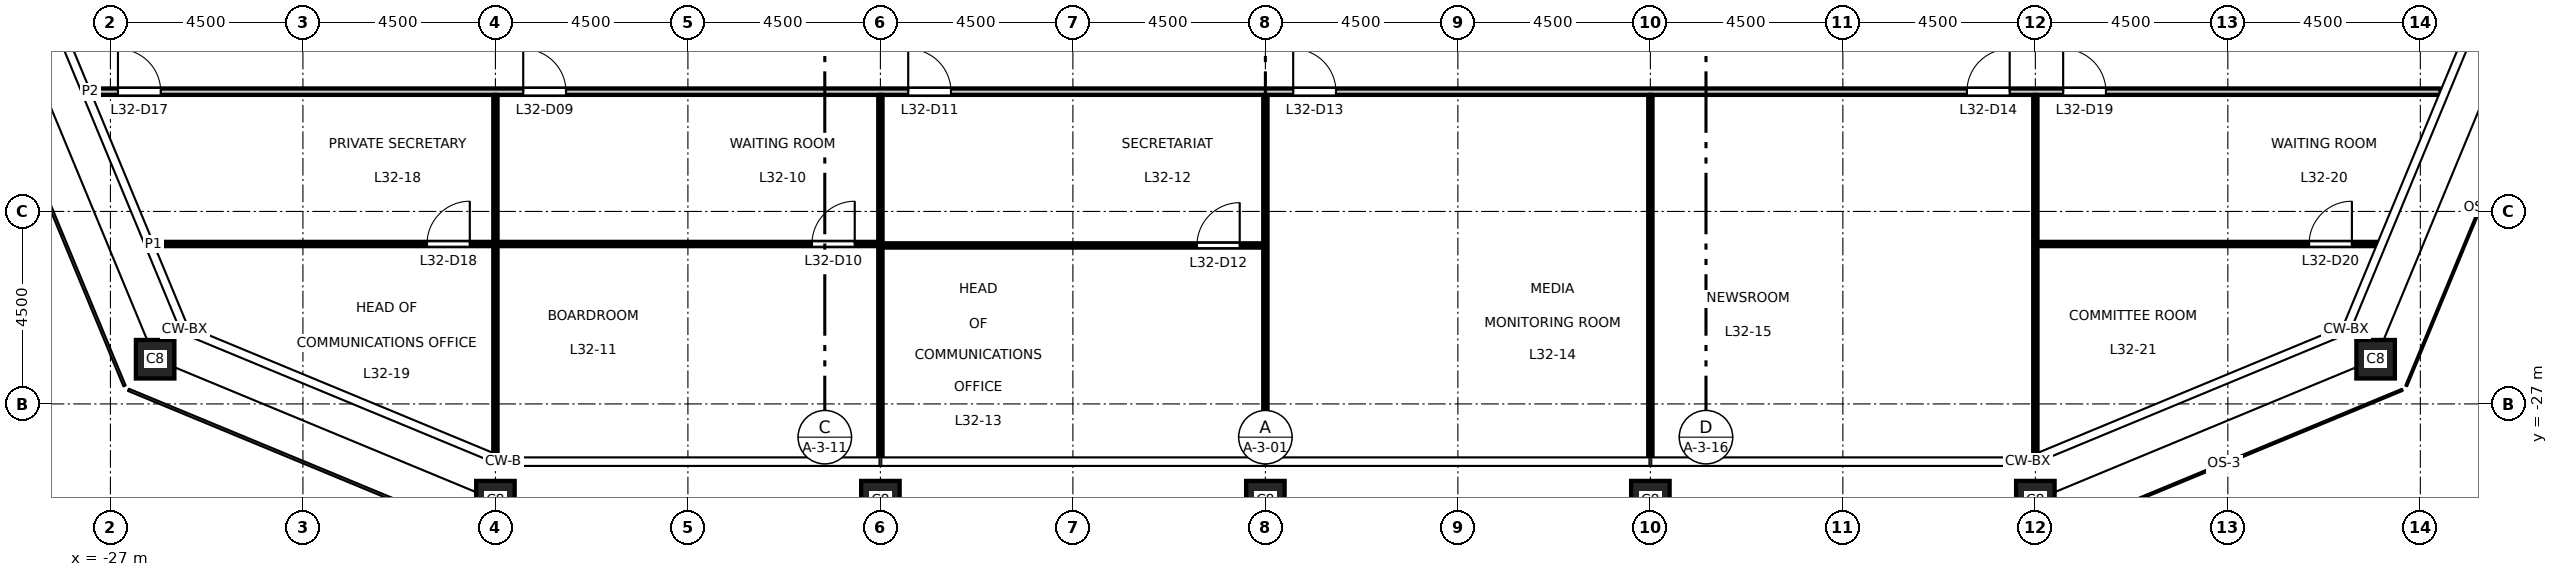
"""IFC4 building model, lengths in metres.
Left out: names, types, materials, properties, quantities, classifications, styles, units other than length and angle.
Written with IfcOpenShell. Run it as: python <this file> out.ifc"""

import sys

from ifc_helpers import new_model, si_unit, direction, frame, frame_2d, origin, origin_2d, place, context, subcontext, project, spatial, rectangle, hollow_rectangle, extrude, element, fill, save


model = new_model("IFC4")
c1 = context("Model", 3, precision=1e-05, world=origin(), true_north=direction((0.0, 1.0)))
c2 = subcontext(c1, "Body", "Model", "MODEL_VIEW")
j1 = project(units=[si_unit("LENGTHUNIT", "METRE"), si_unit("PLANEANGLEUNIT", "RADIAN")], contexts=[c1])
p1 = place(None, origin())
s1 = spatial("IfcSite", under=j1, at=p1, CompositionType="ELEMENT")
p2 = place(p1, origin())
s2 = spatial("IfcBuilding", under=s1, at=p2, CompositionType="ELEMENT")
p3 = place(p2, frame((0.0, 0.0, 149.7)))
s3 = spatial("IfcBuildingStorey", under=s2, at=p3, CompositionType="ELEMENT", Elevation=149.7)
for number, where, z_axis, x_axis in (
    (1, (-18.0, -29.25, 0.0), (0.0, 0.0, 1.0), (1.0, 0.0, 0.0)),
    (2, (-9.0, -29.25, 0.0), (0.0, 0.0, 1.0), (1.0, 0.0, 0.0)),
    (3, (0.0, -29.25, 0.0), (0.0, 0.0, 1.0), (1.0, 0.0, 0.0)),
    (4, (9.0, -29.25, 0.0), (0.0, 0.0, 1.0), (1.0, 0.0, 0.0)),
    (5, (18.0, -29.25, 0.0), (0.0, 0.0, 1.0), (1.0, 0.0, 0.0)),
    (6, (25.955, -25.955, 0.0), (0.0, 0.0, 1.0), (1.0, 0.0, 0.0)),
    (7, (-25.955, -25.955, 0.0), (0.0, 0.0, 1.0), (1.0, 0.0, 0.0)),
):
    element("IfcColumn", number, at=place(p3, frame(where, z_axis=z_axis, x_axis=x_axis)), inside=s3, PredefinedType="COLUMN", context=c2, shape_type="SweptSolid", body=[
        extrude(hollow_rectangle(XDim=0.9, YDim=0.9, WallThickness=0.05, at=origin_2d()), origin(), (0.0, 0.0, 1.0), 4.5),
    ])
p4 = place(p3, frame((-8.95, -23.295, 0.0), z_axis=(0.0, 0.0, 1.0), x_axis=(1.0, 0.0, 0.0)))
e8 = element("IfcWall", 8, at=p4, inside=s3, PredefinedType="PARTITIONING", context=c2, shape_type="SweptSolid", body=[
    extrude(rectangle(XDim=8.9, YDim=0.1, at=frame_2d((4.45, 0.0))), origin(), (0.0, 0.0, 1.0), 4.35),
])
p5 = place(p4, frame((7.35, 0.0, 0.0)))
e9 = element("IfcOpeningElement", 9, at=p5, cuts=e8, PredefinedType="OPENING", context=c2, shape_type="SweptSolid", body=[
    extrude(rectangle(XDim=1.0, YDim=2.1, at=frame_2d((0.5, 1.05))), frame((0.0, 0.06, 0.0), z_axis=(0.0, -1.0, 0.0), x_axis=(1.0, 0.0, 0.0)), (0.0, 0.0, 1.0), 0.12),
])
p6 = place(p3, frame((-25.999, -23.261, 0.0), z_axis=(0.0, 0.0, 1.0), x_axis=(1.0, 0.0, 0.0)))
e10 = element("IfcWall", 10, at=p6, inside=s3, PredefinedType="PARTITIONING", context=c2, shape_type="SweptSolid", body=[
    extrude(rectangle(XDim=16.949, YDim=0.1, at=frame_2d((8.475, 0.0))), origin(), (0.0, 0.0, 1.0), 4.35),
])
p7 = place(p6, frame((15.399, 0.0, 0.0)))
e11 = element("IfcOpeningElement", 11, at=p7, cuts=e10, PredefinedType="OPENING", context=c2, shape_type="SweptSolid", body=[
    extrude(rectangle(XDim=1.0, YDim=2.1, at=frame_2d((0.5, 1.05))), frame((0.0, 0.06, 0.0), z_axis=(0.0, -1.0, 0.0), x_axis=(1.0, 0.0, 0.0)), (0.0, 0.0, 1.0), 0.12),
])
p8 = place(p6, frame((6.4, 0.0, 0.0)))
e12 = element("IfcOpeningElement", 12, at=p8, cuts=e10, PredefinedType="OPENING", context=c2, shape_type="SweptSolid", body=[
    extrude(rectangle(XDim=1.0, YDim=2.1, at=frame_2d((0.5, 1.05))), frame((0.0, 0.06, 0.0), z_axis=(0.0, -1.0, 0.0), x_axis=(1.0, 0.0, 0.0)), (0.0, 0.0, 1.0), 0.12),
])
p9 = place(p3, frame((18.05, -23.261, 0.0), z_axis=(0.0, 0.0, 1.0), x_axis=(1.0, 0.0, 0.0)))
e13 = element("IfcWall", 13, at=p9, inside=s3, PredefinedType="PARTITIONING", context=c2, shape_type="SweptSolid", body=[
    extrude(rectangle(XDim=7.949, YDim=0.1, at=frame_2d((3.975, 0.0))), origin(), (0.0, 0.0, 1.0), 4.35),
])
p10 = place(p9, frame((6.35, 0.0, 0.0)))
e14 = element("IfcOpeningElement", 14, at=p10, cuts=e13, PredefinedType="OPENING", context=c2, shape_type="SweptSolid", body=[
    extrude(rectangle(XDim=1.0, YDim=2.1, at=frame_2d((0.5, 1.05))), frame((0.0, 0.06, 0.0), z_axis=(0.0, -1.0, 0.0), x_axis=(1.0, 0.0, 0.0)), (0.0, 0.0, 1.0), 0.12),
])
p11 = place(p3, frame((-27.474, -19.7, 0.0), z_axis=(0.0, 0.0, 1.0), x_axis=(1.0, 0.0, 0.0)))
e15 = element("IfcWall", 15, at=p11, inside=s3, PredefinedType="PARTITIONING", context=c2, shape_type="SweptSolid", body=[
    extrude(rectangle(XDim=54.948, YDim=0.15, at=frame_2d((27.474, 0.0))), origin(), (0.0, 0.0, 1.0), 4.35),
])
p12 = place(p11, frame((10.124, 0.0, 0.0)))
e16 = element("IfcOpeningElement", 16, at=p12, cuts=e15, PredefinedType="OPENING", context=c2, shape_type="SweptSolid", body=[
    extrude(rectangle(XDim=1.0, YDim=2.1, at=frame_2d((0.5, 1.05))), frame((0.0, 0.085, 0.0), z_axis=(0.0, -1.0, 0.0), x_axis=(1.0, 0.0, 0.0)), (0.0, 0.0, 1.0), 0.17),
])
p13 = place(p11, frame((19.124, 0.0, 0.0)))
e17 = element("IfcOpeningElement", 17, at=p13, cuts=e15, PredefinedType="OPENING", context=c2, shape_type="SweptSolid", body=[
    extrude(rectangle(XDim=1.0, YDim=2.1, at=frame_2d((0.5, 1.05))), frame((0.0, 0.085, 0.0), z_axis=(0.0, -1.0, 0.0), x_axis=(1.0, 0.0, 0.0)), (0.0, 0.0, 1.0), 0.17),
])
p14 = place(p11, frame((28.124, 0.0, 0.0)))
e18 = element("IfcOpeningElement", 18, at=p14, cuts=e15, PredefinedType="OPENING", context=c2, shape_type="SweptSolid", body=[
    extrude(rectangle(XDim=1.0, YDim=2.1, at=frame_2d((0.5, 1.05))), frame((0.0, 0.085, 0.0), z_axis=(0.0, -1.0, 0.0), x_axis=(1.0, 0.0, 0.0)), (0.0, 0.0, 1.0), 0.17),
])
p15 = place(p11, frame((43.874, 0.0, 0.0)))
e19 = element("IfcOpeningElement", 19, at=p15, cuts=e15, PredefinedType="OPENING", context=c2, shape_type="SweptSolid", body=[
    extrude(rectangle(XDim=1.0, YDim=2.1, at=frame_2d((0.5, 1.05))), frame((0.0, 0.085, 0.0), z_axis=(0.0, -1.0, 0.0), x_axis=(1.0, 0.0, 0.0)), (0.0, 0.0, 1.0), 0.17),
])
p16 = place(p11, frame((0.65, 0.0, 0.0)))
e20 = element("IfcOpeningElement", 20, at=p16, cuts=e15, PredefinedType="OPENING", context=c2, shape_type="SweptSolid", body=[
    extrude(rectangle(XDim=1.0, YDim=2.1, at=frame_2d((0.5, 1.05))), frame((0.0, 0.085, 0.0), z_axis=(0.0, -1.0, 0.0), x_axis=(1.0, 0.0, 0.0)), (0.0, 0.0, 1.0), 0.17),
])
p17 = place(p11, frame((46.124, 0.0, 0.0)))
e21 = element("IfcOpeningElement", 21, at=p17, cuts=e15, PredefinedType="OPENING", context=c2, shape_type="SweptSolid", body=[
    extrude(rectangle(XDim=1.0, YDim=2.1, at=frame_2d((0.5, 1.05))), frame((0.0, 0.085, 0.0), z_axis=(0.0, -1.0, 0.0), x_axis=(1.0, 0.0, 0.0)), (0.0, 0.0, 1.0), 0.17),
])
p18 = place(p3, frame((-18.0, -28.178, 0.0), z_axis=(0.0, 0.0, 1.0), x_axis=(0.0, 1.0, 0.0)))
e22 = element("IfcWall", 22, at=p18, inside=s3, PredefinedType="PARTITIONING", context=c2, shape_type="SweptSolid", body=[
    extrude(rectangle(XDim=4.867, YDim=0.1, at=frame_2d((2.434, 0.0))), origin(), (0.0, 0.0, 1.0), 3.45),
])
p19 = place(p3, frame((-18.0, -23.211, 0.0), z_axis=(0.0, 0.0, 1.0), x_axis=(0.0, 1.0, 0.0)))
e23 = element("IfcWall", 23, at=p19, inside=s3, PredefinedType="PARTITIONING", context=c2, shape_type="SweptSolid", body=[
    extrude(rectangle(XDim=3.436, YDim=0.1, at=frame_2d((1.718, 0.0))), origin(), (0.0, 0.0, 1.0), 3.45),
])
for number, where, z_axis, x_axis in (
    (24, (-9.0, -28.26, 0.0), (0.0, 0.0, 1.0), (0.0, 1.0, 0.0)),
    (25, (0.0, -28.26, 0.0), (0.0, 0.0, 1.0), (0.0, 1.0, 0.0)),
    (26, (9.0, -28.26, 0.0), (0.0, 0.0, 1.0), (0.0, 1.0, 0.0)),
):
    element("IfcWall", number, at=place(p3, frame(where, z_axis=z_axis, x_axis=x_axis)), inside=s3, PredefinedType="PARTITIONING", context=c2, shape_type="SweptSolid", body=[
        extrude(rectangle(XDim=8.485, YDim=0.1, at=frame_2d((4.243, 0.0))), origin(), (0.0, 0.0, 1.0), 3.45),
    ])
p20 = place(p3, frame((18.0, -28.178, 0.0), z_axis=(0.0, 0.0, 1.0), x_axis=(0.0, 1.0, 0.0)))
e27 = element("IfcWall", 27, at=p20, inside=s3, PredefinedType="PARTITIONING", context=c2, shape_type="SweptSolid", body=[
    extrude(rectangle(XDim=8.403, YDim=0.1, at=frame_2d((4.202, 0.0))), origin(), (0.0, 0.0, 1.0), 3.45),
])
p21 = place(p12, origin())
e28 = element("IfcDoor", 28, at=p21, inside=s3, OperationType="SINGLE_SWING_LEFT", PredefinedType="DOOR", context=c2, shape_type="SweptSolid", body=[
    extrude(rectangle(XDim=1.0, YDim=2.1, at=frame_2d((0.5, 1.05))), frame((0.0, 0.025, 0.0), z_axis=(0.0, -1.0, 0.0), x_axis=(1.0, 0.0, 0.0)), (0.0, 0.0, 1.0), 0.05),
])
fill(e16, e28)
p22 = place(p7, origin())
e29 = element("IfcDoor", 29, at=p22, inside=s3, OperationType="SINGLE_SWING_RIGHT", PredefinedType="DOOR", context=c2, shape_type="SweptSolid", body=[
    extrude(rectangle(XDim=1.0, YDim=2.1, at=frame_2d((0.5, 1.05))), frame((0.0, 0.025, 0.0), z_axis=(0.0, -1.0, 0.0), x_axis=(1.0, 0.0, 0.0)), (0.0, 0.0, 1.0), 0.05),
])
fill(e11, e29)
p23 = place(p13, origin())
e30 = element("IfcDoor", 30, at=p23, inside=s3, OperationType="SINGLE_SWING_LEFT", PredefinedType="DOOR", context=c2, shape_type="SweptSolid", body=[
    extrude(rectangle(XDim=1.0, YDim=2.1, at=frame_2d((0.5, 1.05))), frame((0.0, 0.025, 0.0), z_axis=(0.0, -1.0, 0.0), x_axis=(1.0, 0.0, 0.0)), (0.0, 0.0, 1.0), 0.05),
])
fill(e17, e30)
p24 = place(p5, origin())
e31 = element("IfcDoor", 31, at=p24, inside=s3, OperationType="SINGLE_SWING_RIGHT", PredefinedType="DOOR", context=c2, shape_type="SweptSolid", body=[
    extrude(rectangle(XDim=1.0, YDim=2.1, at=frame_2d((0.5, 1.05))), frame((0.0, 0.025, 0.0), z_axis=(0.0, -1.0, 0.0), x_axis=(1.0, 0.0, 0.0)), (0.0, 0.0, 1.0), 0.05),
])
fill(e9, e31)
p25 = place(p14, origin())
e32 = element("IfcDoor", 32, at=p25, inside=s3, OperationType="SINGLE_SWING_LEFT", PredefinedType="DOOR", context=c2, shape_type="SweptSolid", body=[
    extrude(rectangle(XDim=1.0, YDim=2.1, at=frame_2d((0.5, 1.05))), frame((0.0, 0.025, 0.0), z_axis=(0.0, -1.0, 0.0), x_axis=(1.0, 0.0, 0.0)), (0.0, 0.0, 1.0), 0.05),
])
fill(e18, e32)
p26 = place(p15, origin())
e33 = element("IfcDoor", 33, at=p26, inside=s3, OperationType="SINGLE_SWING_RIGHT", PredefinedType="DOOR", context=c2, shape_type="SweptSolid", body=[
    extrude(rectangle(XDim=1.0, YDim=2.1, at=frame_2d((0.5, 1.05))), frame((0.0, 0.025, 0.0), z_axis=(0.0, -1.0, 0.0), x_axis=(1.0, 0.0, 0.0)), (0.0, 0.0, 1.0), 0.05),
])
fill(e19, e33)
p27 = place(p16, origin())
e34 = element("IfcDoor", 34, at=p27, inside=s3, OperationType="SINGLE_SWING_LEFT", PredefinedType="DOOR", context=c2, shape_type="SweptSolid", body=[
    extrude(rectangle(XDim=1.0, YDim=2.1, at=frame_2d((0.5, 1.05))), frame((0.0, 0.025, 0.0), z_axis=(0.0, -1.0, 0.0), x_axis=(1.0, 0.0, 0.0)), (0.0, 0.0, 1.0), 0.05),
])
fill(e20, e34)
p28 = place(p8, origin())
e35 = element("IfcDoor", 35, at=p28, inside=s3, OperationType="SINGLE_SWING_RIGHT", PredefinedType="DOOR", context=c2, shape_type="SweptSolid", body=[
    extrude(rectangle(XDim=1.0, YDim=2.1, at=frame_2d((0.5, 1.05))), frame((0.0, 0.025, 0.0), z_axis=(0.0, -1.0, 0.0), x_axis=(1.0, 0.0, 0.0)), (0.0, 0.0, 1.0), 0.05),
])
fill(e12, e35)
p29 = place(p17, origin())
e36 = element("IfcDoor", 36, at=p29, inside=s3, OperationType="SINGLE_SWING_LEFT", PredefinedType="DOOR", context=c2, shape_type="SweptSolid", body=[
    extrude(rectangle(XDim=1.0, YDim=2.1, at=frame_2d((0.5, 1.05))), frame((0.0, 0.025, 0.0), z_axis=(0.0, -1.0, 0.0), x_axis=(1.0, 0.0, 0.0)), (0.0, 0.0, 1.0), 0.05),
])
fill(e21, e36)
p30 = place(p10, origin())
e37 = element("IfcDoor", 37, at=p30, inside=s3, OperationType="SINGLE_SWING_RIGHT", PredefinedType="DOOR", context=c2, shape_type="SweptSolid", body=[
    extrude(rectangle(XDim=1.0, YDim=2.1, at=frame_2d((0.5, 1.05))), frame((0.0, 0.025, 0.0), z_axis=(0.0, -1.0, 0.0), x_axis=(1.0, 0.0, 0.0)), (0.0, 0.0, 1.0), 0.05),
])
fill(e14, e37)
save(model, sys.argv[1])
